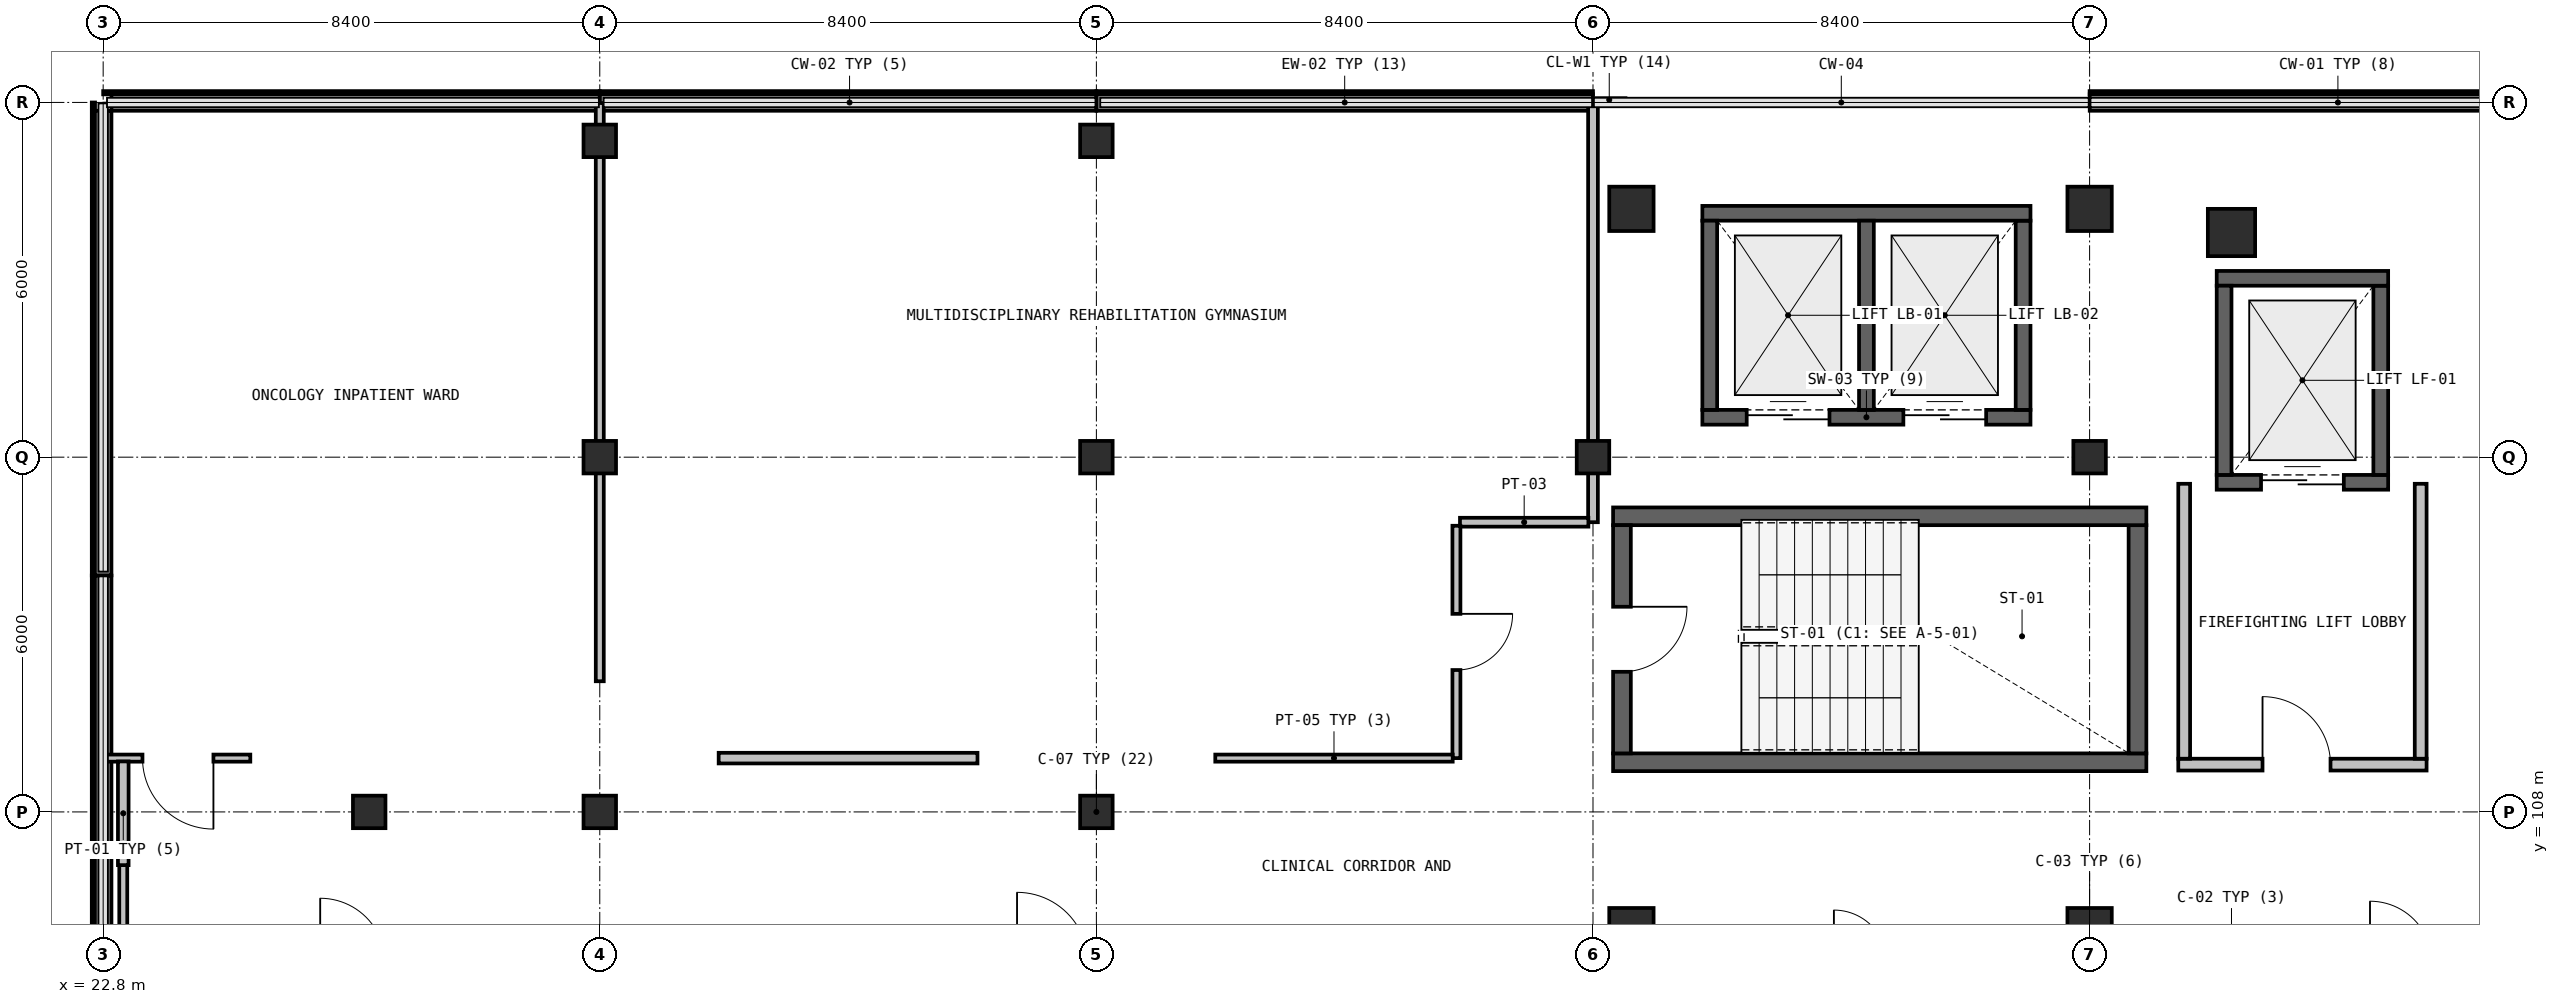
"""IFC4 building model, lengths in metres.
Left out: names, types, materials, properties, quantities, classifications, styles, units other than length and angle.
Written with IfcOpenShell. Run it as: python <this file> out.ifc"""

import sys

from ifc_helpers import new_model, si_unit, direction, frame, frame_2d, origin, origin_2d, place, context, subcontext, project, spatial, rectangle, extrude, element, fill, save


model = new_model("IFC4")
c1 = context("Model", 3, precision=1e-05, world=origin(), true_north=direction((0.0, 1.0)))
c2 = subcontext(c1, "Body", "Model", "MODEL_VIEW")
j1 = project(units=[si_unit("LENGTHUNIT", "METRE"), si_unit("PLANEANGLEUNIT", "RADIAN")], contexts=[c1])
p1 = place(None, origin())
s1 = spatial("IfcSite", under=j1, at=p1, CompositionType="ELEMENT")
p2 = place(p1, origin())
s2 = spatial("IfcBuilding", under=s1, at=p2, CompositionType="ELEMENT")
p3 = place(p2, frame((0.0, 0.0, 31.35)))
s3 = spatial("IfcBuildingStorey", under=s2, at=p3, CompositionType="ELEMENT", Elevation=31.35)
p4 = place(p3, frame((58.8, 117.8, 0.0), z_axis=(0.0, 0.0, 1.0), x_axis=(1.0, 0.0, 0.0)))
e1 = element("IfcColumn", 1, at=p4, inside=s3, PredefinedType="COLUMN", context=c2, shape_type="SweptSolid", body=[
    extrude(rectangle(XDim=0.8, YDim=0.8, at=origin_2d()), origin(), (0.0, 0.0, 1.0), 4.05),
])
for number, where, z_axis, x_axis in (
    (2, (48.65, 106.0, 0.0), (0.0, 0.0, 1.0), (1.0, 0.0, 0.0)),
    (3, (56.4, 106.0, 0.0), (0.0, 0.0, 1.0), (1.0, 0.0, 0.0)),
    (4, (48.65, 118.2, 0.0), (0.0, 0.0, 1.0), (1.0, 0.0, 0.0)),
    (5, (56.4, 118.2, 0.0), (0.0, 0.0, 1.0), (1.0, 0.0, 0.0)),
):
    element("IfcColumn", number, at=place(p3, frame(where, z_axis=z_axis, x_axis=x_axis)), inside=s3, PredefinedType="COLUMN", context=c2, shape_type="SweptSolid", body=[
        extrude(rectangle(XDim=0.75, YDim=0.75, at=origin_2d()), origin(), (0.0, 0.0, 1.0), 4.05),
    ])
p5 = place(p3, frame((27.3, 108.0, 0.0), z_axis=(0.0, 0.0, 1.0), x_axis=(1.0, 0.0, 0.0)))
e6 = element("IfcColumn", 6, at=p5, inside=s3, PredefinedType="COLUMN", context=c2, shape_type="SweptSolid", body=[
    extrude(rectangle(XDim=0.55, YDim=0.55, at=origin_2d()), origin(), (0.0, 0.0, 1.0), 3.778),
])
for number, where, z_axis, x_axis in (
    (7, (31.2, 108.0, 0.0), (0.0, 0.0, 1.0), (1.0, 0.0, 0.0)),
    (8, (31.2, 114.0, 0.0), (0.0, 0.0, 1.0), (1.0, 0.0, 0.0)),
    (9, (31.2, 119.35, 0.0), (0.0, 0.0, 1.0), (1.0, 0.0, 0.0)),
):
    element("IfcColumn", number, at=place(p3, frame(where, z_axis=z_axis, x_axis=x_axis)), inside=s3, PredefinedType="COLUMN", context=c2, shape_type="SweptSolid", body=[
        extrude(rectangle(XDim=0.55, YDim=0.55, at=origin_2d()), origin(), (0.0, 0.0, 1.0), 3.785),
    ])
for number, where, z_axis, x_axis in (
    (10, (39.6, 108.0, 0.0), (0.0, 0.0, 1.0), (1.0, 0.0, 0.0)),
    (11, (39.6, 114.0, 0.0), (0.0, 0.0, 1.0), (1.0, 0.0, 0.0)),
    (12, (39.6, 119.35, 0.0), (0.0, 0.0, 1.0), (1.0, 0.0, 0.0)),
    (13, (48.0, 114.0, 0.0), (0.0, 0.0, 1.0), (1.0, 0.0, 0.0)),
    (14, (56.4, 114.0, 0.0), (0.0, 0.0, 1.0), (1.0, 0.0, 0.0)),
):
    element("IfcColumn", number, at=place(p3, frame(where, z_axis=z_axis, x_axis=x_axis)), inside=s3, PredefinedType="COLUMN", context=c2, shape_type="SweptSolid", body=[
        extrude(rectangle(XDim=0.55, YDim=0.55, at=origin_2d()), origin(), (0.0, 0.0, 1.0), 4.05),
    ])
p6 = place(p3, frame((22.8, 104.001, 0.0), z_axis=(0.0, 0.0, 1.0), x_axis=(0.0, 1.0, 0.0)))
e15 = element("IfcWall", 15, at=p6, inside=s3, PredefinedType="SOLIDWALL", context=c2, shape_type="SweptSolid", body=[
    extrude(rectangle(XDim=7.996, YDim=0.28, at=frame_2d((3.998, 0.0))), origin(), (0.0, 0.0, 1.0), 0.94),
])
p7 = place(p3, frame((22.8, 112.001, 0.0), z_axis=(0.0, 0.0, 1.0), x_axis=(0.0, 1.0, 0.0)))
e16 = element("IfcWall", 16, at=p7, inside=s3, PredefinedType="SOLIDWALL", context=c2, shape_type="SweptSolid", body=[
    extrude(rectangle(XDim=7.858, YDim=0.28, at=frame_2d((3.929, 0.0))), origin(), (0.0, 0.0, 1.0), 0.94),
])
p8 = place(p3, frame((22.94, 119.999, 0.0), z_axis=(0.0, 0.0, 1.0), x_axis=(1.0, 0.0, 0.0)))
e17 = element("IfcWall", 17, at=p8, inside=s3, PredefinedType="SOLIDWALL", context=c2, shape_type="SweptSolid", body=[
    extrude(rectangle(XDim=8.258, YDim=0.28, at=frame_2d((4.129, 0.0))), origin(), (0.0, 0.0, 1.0), 0.94),
])
for number, where, z_axis, x_axis in (
    (18, (31.202, 119.999, 0.0), (0.0, 0.0, 1.0), (1.0, 0.0, 0.0)),
    (19, (39.602, 119.999, 0.0), (0.0, 0.0, 1.0), (1.0, 0.0, 0.0)),
    (20, (56.402, 119.999, 0.0), (0.0, 0.0, 1.0), (1.0, 0.0, 0.0)),
):
    element("IfcWall", number, at=place(p3, frame(where, z_axis=z_axis, x_axis=x_axis)), inside=s3, PredefinedType="SOLIDWALL", context=c2, shape_type="SweptSolid", body=[
        extrude(rectangle(XDim=8.396, YDim=0.28, at=frame_2d((4.198, 0.0))), origin(), (0.0, 0.0, 1.0), 0.94),
    ])
p9 = place(p3, frame((48.34, 108.84, 0.0), z_axis=(0.0, 0.0, 1.0), x_axis=(1.0, 0.0, 0.0)))
e21 = element("IfcWall", 21, at=p9, inside=s3, PredefinedType="SHEAR", context=c2, shape_type="SweptSolid", body=[
    extrude(rectangle(XDim=9.02, YDim=0.3, at=frame_2d((4.51, 0.0))), origin(), (0.0, 0.0, 1.0), 3.785),
])
p10 = place(p3, frame((57.21, 108.99, 0.0), z_axis=(0.0, 0.0, 1.0), x_axis=(0.0, 1.0, 0.0)))
e22 = element("IfcWall", 22, at=p10, inside=s3, PredefinedType="SHEAR", context=c2, shape_type="SweptSolid", body=[
    extrude(rectangle(XDim=3.86, YDim=0.3, at=frame_2d((1.93, 0.0))), origin(), (0.0, 0.0, 1.0), 3.785),
])
p11 = place(p3, frame((57.36, 113.0, 0.0), z_axis=(0.0, 0.0, 1.0), x_axis=(-1.0, 0.0, 0.0)))
e23 = element("IfcWall", 23, at=p11, inside=s3, PredefinedType="SHEAR", context=c2, shape_type="SweptSolid", body=[
    extrude(rectangle(XDim=9.02, YDim=0.3, at=frame_2d((4.51, 0.0))), origin(), (0.0, 0.0, 1.0), 3.785),
])
p12 = place(p3, frame((48.49, 112.85, 0.0), z_axis=(0.0, 0.0, 1.0), x_axis=(0.0, -1.0, 0.0)))
e24 = element("IfcWall", 24, at=p12, inside=s3, PredefinedType="SHEAR", context=c2, shape_type="SweptSolid", body=[
    extrude(rectangle(XDim=3.86, YDim=0.3, at=frame_2d((1.93, 0.0))), origin(), (0.0, 0.0, 1.0), 3.785),
])
p13 = place(p12, frame((1.38, 0.0, 0.0)))
e25 = element("IfcOpeningElement", 25, at=p13, cuts=e24, PredefinedType="OPENING", context=c2, shape_type="SweptSolid", body=[
    extrude(rectangle(XDim=1.1, YDim=2.15, at=frame_2d((0.55, 1.075))), frame((0.0, 0.16, 0.0), z_axis=(0.0, -1.0, 0.0), x_axis=(1.0, 0.0, 0.0)), (0.0, 0.0, 1.0), 0.32),
])
p14 = place(p3, frame((57.9, 108.8, 0.0), z_axis=(0.0, 0.0, 1.0), x_axis=(1.0, 0.0, 0.0)))
e26 = element("IfcWall", 26, at=p14, inside=s3, PredefinedType="SOLIDWALL", context=c2, shape_type="SweptSolid", body=[
    extrude(rectangle(XDim=4.2, YDim=0.2, at=frame_2d((2.1, 0.0))), origin(), (0.0, 0.0, 1.0), 3.785),
])
p15 = place(p14, frame((1.425, 0.0, 0.0)))
e27 = element("IfcOpeningElement", 27, at=p15, cuts=e26, PredefinedType="OPENING", context=c2, shape_type="SweptSolid", body=[
    extrude(rectangle(XDim=1.15, YDim=2.15, at=frame_2d((0.575, 1.075))), frame((0.0, 0.11, 0.0), z_axis=(0.0, -1.0, 0.0), x_axis=(1.0, 0.0, 0.0)), (0.0, 0.0, 1.0), 0.22),
])
for number, where, z_axis, x_axis in (
    (28, (62.0, 108.9, 0.0), (0.0, 0.0, 1.0), (0.0, 1.0, 0.0)),
    (29, (58.0, 113.55, 0.0), (0.0, 0.0, 1.0), (0.0, -1.0, 0.0)),
):
    element("IfcWall", number, at=place(p3, frame(where, z_axis=z_axis, x_axis=x_axis)), inside=s3, PredefinedType="SOLIDWALL", context=c2, shape_type="SweptSolid", body=[
        extrude(rectangle(XDim=4.65, YDim=0.2, at=frame_2d((2.325, 0.0))), origin(), (0.0, 0.0, 1.0), 3.785),
    ])
p16 = place(p3, frame((58.55, 113.575, 0.0), z_axis=(0.0, 0.0, 1.0), x_axis=(1.0, 0.0, 0.0)))
e30 = element("IfcWall", 30, at=p16, inside=s3, PredefinedType="SHEAR", context=c2, shape_type="SweptSolid", body=[
    extrude(rectangle(XDim=2.9, YDim=0.25, at=frame_2d((1.45, 0.0))), origin(), (0.0, 0.0, 1.0), 3.785),
])
p17 = place(p16, frame((0.75, 0.0, 0.0)))
e31 = element("IfcOpeningElement", 31, at=p17, cuts=e30, PredefinedType="OPENING", context=c2, shape_type="SweptSolid", body=[
    extrude(rectangle(XDim=1.4, YDim=2.15, at=frame_2d((0.7, 1.075))), frame((0.0, 0.135, 0.0), z_axis=(0.0, -1.0, 0.0), x_axis=(1.0, 0.0, 0.0)), (0.0, 0.0, 1.0), 0.27),
])
p18 = place(p3, frame((61.325, 113.7, 0.0), z_axis=(0.0, 0.0, 1.0), x_axis=(0.0, 1.0, 0.0)))
e32 = element("IfcWall", 32, at=p18, inside=s3, PredefinedType="SHEAR", context=c2, shape_type="SweptSolid", body=[
    extrude(rectangle(XDim=3.2, YDim=0.25, at=frame_2d((1.6, 0.0))), origin(), (0.0, 0.0, 1.0), 3.785),
])
p19 = place(p3, frame((61.45, 117.025, 0.0), z_axis=(0.0, 0.0, 1.0), x_axis=(-1.0, 0.0, 0.0)))
e33 = element("IfcWall", 33, at=p19, inside=s3, PredefinedType="SHEAR", context=c2, shape_type="SweptSolid", body=[
    extrude(rectangle(XDim=2.9, YDim=0.25, at=frame_2d((1.45, 0.0))), origin(), (0.0, 0.0, 1.0), 3.785),
])
p20 = place(p3, frame((58.675, 116.9, 0.0), z_axis=(0.0, 0.0, 1.0), x_axis=(0.0, -1.0, 0.0)))
e34 = element("IfcWall", 34, at=p20, inside=s3, PredefinedType="SHEAR", context=c2, shape_type="SweptSolid", body=[
    extrude(rectangle(XDim=3.2, YDim=0.25, at=frame_2d((1.6, 0.0))), origin(), (0.0, 0.0, 1.0), 3.785),
])
p21 = place(p3, frame((49.85, 114.675, 0.0), z_axis=(0.0, 0.0, 1.0), x_axis=(1.0, 0.0, 0.0)))
e35 = element("IfcWall", 35, at=p21, inside=s3, PredefinedType="SHEAR", context=c2, shape_type="SweptSolid", body=[
    extrude(rectangle(XDim=5.55, YDim=0.25, at=frame_2d((2.775, 0.0))), origin(), (0.0, 0.0, 1.0), 3.785),
])
p22 = place(p21, frame((0.75, 0.0, 0.0)))
e36 = element("IfcOpeningElement", 36, at=p22, cuts=e35, PredefinedType="OPENING", context=c2, shape_type="SweptSolid", body=[
    extrude(rectangle(XDim=1.4, YDim=2.2, at=frame_2d((0.7, 1.1))), frame((0.0, 0.135, 0.0), z_axis=(0.0, -1.0, 0.0), x_axis=(1.0, 0.0, 0.0)), (0.0, 0.0, 1.0), 0.27),
])
p23 = place(p21, frame((3.4, 0.0, 0.0)))
e37 = element("IfcOpeningElement", 37, at=p23, cuts=e35, PredefinedType="OPENING", context=c2, shape_type="SweptSolid", body=[
    extrude(rectangle(XDim=1.4, YDim=2.2, at=frame_2d((0.7, 1.1))), frame((0.0, 0.135, 0.0), z_axis=(0.0, -1.0, 0.0), x_axis=(1.0, 0.0, 0.0)), (0.0, 0.0, 1.0), 0.27),
])
p24 = place(p3, frame((55.275, 114.8, 0.0), z_axis=(0.0, 0.0, 1.0), x_axis=(0.0, 1.0, 0.0)))
e38 = element("IfcWall", 38, at=p24, inside=s3, PredefinedType="SHEAR", context=c2, shape_type="SweptSolid", body=[
    extrude(rectangle(XDim=3.2, YDim=0.25, at=frame_2d((1.6, 0.0))), origin(), (0.0, 0.0, 1.0), 3.785),
])
p25 = place(p3, frame((55.4, 118.125, 0.0), z_axis=(0.0, 0.0, 1.0), x_axis=(-1.0, 0.0, 0.0)))
e39 = element("IfcWall", 39, at=p25, inside=s3, PredefinedType="SHEAR", context=c2, shape_type="SweptSolid", body=[
    extrude(rectangle(XDim=5.55, YDim=0.25, at=frame_2d((2.775, 0.0))), origin(), (0.0, 0.0, 1.0), 3.785),
])
for number, where, z_axis, x_axis in (
    (40, (49.975, 118.0, 0.0), (0.0, 0.0, 1.0), (0.0, -1.0, 0.0)),
    (41, (52.625, 114.8, 0.0), (0.0, 0.0, 1.0), (0.0, 1.0, 0.0)),
):
    element("IfcWall", number, at=place(p3, frame(where, z_axis=z_axis, x_axis=x_axis)), inside=s3, PredefinedType="SHEAR", context=c2, shape_type="SweptSolid", body=[
        extrude(rectangle(XDim=3.2, YDim=0.25, at=frame_2d((1.6, 0.0))), origin(), (0.0, 0.0, 1.0), 3.785),
    ])
p26 = place(p3, frame((23.14, 107.1, 0.0), z_axis=(0.0, 0.0, 1.0), x_axis=(0.0, -1.0, 0.0)))
e42 = element("IfcWall", 42, at=p26, inside=s3, PredefinedType="PARTITIONING", context=c2, shape_type="SweptSolid", body=[
    extrude(rectangle(XDim=1.6, YDim=0.135, at=frame_2d((0.8, 0.0))), origin(), (0.0, 0.0, 1.0), 3.785),
])
p27 = place(p3, frame((31.2, 119.99, 0.0), z_axis=(0.0, 0.0, 1.0), x_axis=(0.0, -1.0, 0.0)))
e43 = element("IfcWall", 43, at=p27, inside=s3, PredefinedType="PARTITIONING", context=c2, shape_type="SweptSolid", body=[
    extrude(rectangle(XDim=9.78, YDim=0.135, at=frame_2d((4.89, 0.0))), origin(), (0.0, 0.0, 1.0), 3.785),
])
p28 = place(p3, frame((25.289, 108.91, 0.0), z_axis=(0.0, 0.0, 1.0), x_axis=(-1.0, 0.0, 0.0)))
e44 = element("IfcWall", 44, at=p28, inside=s3, PredefinedType="PARTITIONING", context=c2, shape_type="SweptSolid", body=[
    extrude(rectangle(XDim=2.447, YDim=0.12, at=frame_2d((1.224, 0.0))), origin(), (0.0, 0.0, 1.0), 3.785),
])
p29 = place(p28, frame((0.624, 0.0, 0.0)))
e45 = element("IfcOpeningElement", 45, at=p29, cuts=e44, PredefinedType="OPENING", context=c2, shape_type="SweptSolid", body=[
    extrude(rectangle(XDim=1.2, YDim=2.15, at=frame_2d((0.6, 1.075))), frame((0.0, 0.07, 0.0), z_axis=(0.0, -1.0, 0.0), x_axis=(1.0, 0.0, 0.0)), (0.0, 0.0, 1.0), 0.14),
])
p30 = place(p3, frame((23.14, 108.854, 0.0), z_axis=(0.0, 0.0, 1.0), x_axis=(0.0, -1.0, 0.0)))
e46 = element("IfcWall", 46, at=p30, inside=s3, PredefinedType="PARTITIONING", context=c2, shape_type="SweptSolid", body=[
    extrude(rectangle(XDim=1.754, YDim=0.18, at=frame_2d((0.877, 0.0))), origin(), (0.0, 0.0, 1.0), 3.785),
])
p31 = place(p3, frame((48.0, 119.99, 0.0), z_axis=(0.0, 0.0, 1.0), x_axis=(0.0, -1.0, 0.0)))
e47 = element("IfcWall", 47, at=p31, inside=s3, PredefinedType="PARTITIONING", context=c2, shape_type="SweptSolid", body=[
    extrude(rectangle(XDim=7.09, YDim=0.165, at=frame_2d((3.545, 0.0))), origin(), (0.0, 0.0, 1.0), 3.185),
])
p32 = place(p3, frame((47.922, 112.9, 0.0), z_axis=(0.0, 0.0, 1.0), x_axis=(-1.0, 0.0, 0.0)))
e48 = element("IfcWall", 48, at=p32, inside=s3, PredefinedType="PARTITIONING", context=c2, shape_type="SweptSolid", body=[
    extrude(rectangle(XDim=2.172, YDim=0.15, at=frame_2d((1.086, 0.0))), origin(), (0.0, 0.0, 1.0), 3.785),
])
p33 = place(p3, frame((45.69, 112.84, 0.0), z_axis=(0.0, 0.0, 1.0), x_axis=(0.0, -1.0, 0.0)))
e49 = element("IfcWall", 49, at=p33, inside=s3, PredefinedType="PARTITIONING", context=c2, shape_type="SweptSolid", body=[
    extrude(rectangle(XDim=3.93, YDim=0.135, at=frame_2d((1.965, 0.0))), origin(), (0.0, 0.0, 1.0), 3.785),
])
p34 = place(p33, frame((1.49, 0.0, 0.0)))
e50 = element("IfcOpeningElement", 50, at=p34, cuts=e49, PredefinedType="OPENING", context=c2, shape_type="SweptSolid", body=[
    extrude(rectangle(XDim=0.95, YDim=2.1, at=frame_2d((0.475, 1.05))), frame((0.0, 0.077, 0.0), z_axis=(0.0, -1.0, 0.0), x_axis=(1.0, 0.0, 0.0)), (0.0, 0.0, 1.0), 0.155),
])
p35 = place(p3, frame((45.627, 108.91, 0.0), z_axis=(0.0, 0.0, 1.0), x_axis=(-1.0, 0.0, 0.0)))
e51 = element("IfcWall", 51, at=p35, inside=s3, PredefinedType="PARTITIONING", context=c2, shape_type="SweptSolid", body=[
    extrude(rectangle(XDim=4.016, YDim=0.12, at=frame_2d((2.008, 0.0))), origin(), (0.0, 0.0, 1.0), 3.785),
])
p36 = place(p3, frame((37.589, 108.91, 0.0), z_axis=(0.0, 0.0, 1.0), x_axis=(-1.0, 0.0, 0.0)))
e52 = element("IfcWall", 52, at=p36, inside=s3, PredefinedType="PARTITIONING", context=c2, shape_type="SweptSolid", body=[
    extrude(rectangle(XDim=4.378, YDim=0.18, at=frame_2d((2.189, 0.0))), origin(), (0.0, 0.0, 1.0), 3.785),
])
p37 = place(p13, origin())
e53 = element("IfcDoor", 53, at=p37, inside=s3, OperationType="SINGLE_SWING_LEFT", PredefinedType="DOOR", context=c2, shape_type="SweptSolid", body=[
    extrude(rectangle(XDim=1.1, YDim=2.15, at=frame_2d((0.55, 1.075))), frame((0.0, 0.025, 0.0), z_axis=(0.0, -1.0, 0.0), x_axis=(1.0, 0.0, 0.0)), (0.0, 0.0, 1.0), 0.05),
])
fill(e25, e53)
p38 = place(p15, origin())
e54 = element("IfcDoor", 54, at=p38, inside=s3, OperationType="SINGLE_SWING_RIGHT", PredefinedType="DOOR", context=c2, shape_type="SweptSolid", body=[
    extrude(rectangle(XDim=1.15, YDim=2.15, at=frame_2d((0.575, 1.075))), frame((0.0, 0.025, 0.0), z_axis=(0.0, -1.0, 0.0), x_axis=(1.0, 0.0, 0.0)), (0.0, 0.0, 1.0), 0.05),
])
fill(e27, e54)
p39 = place(p17, origin())
e55 = element("IfcDoor", 55, at=p39, inside=s3, OperationType="DOUBLE_DOOR_SLIDING", PredefinedType="DOOR", context=c2, shape_type="SweptSolid", body=[
    extrude(rectangle(XDim=1.4, YDim=2.15, at=frame_2d((0.7, 1.075))), frame((0.0, 0.025, 0.0), z_axis=(0.0, -1.0, 0.0), x_axis=(1.0, 0.0, 0.0)), (0.0, 0.0, 1.0), 0.05),
])
fill(e31, e55)
p40 = place(p22, origin())
e56 = element("IfcDoor", 56, at=p40, inside=s3, OperationType="DOUBLE_DOOR_SLIDING", PredefinedType="DOOR", context=c2, shape_type="SweptSolid", body=[
    extrude(rectangle(XDim=1.4, YDim=2.2, at=frame_2d((0.7, 1.1))), frame((0.0, 0.025, 0.0), z_axis=(0.0, -1.0, 0.0), x_axis=(1.0, 0.0, 0.0)), (0.0, 0.0, 1.0), 0.05),
])
fill(e36, e56)
p41 = place(p23, origin())
e57 = element("IfcDoor", 57, at=p41, inside=s3, OperationType="DOUBLE_DOOR_SLIDING", PredefinedType="DOOR", context=c2, shape_type="SweptSolid", body=[
    extrude(rectangle(XDim=1.4, YDim=2.2, at=frame_2d((0.7, 1.1))), frame((0.0, 0.025, 0.0), z_axis=(0.0, -1.0, 0.0), x_axis=(1.0, 0.0, 0.0)), (0.0, 0.0, 1.0), 0.05),
])
fill(e37, e57)
p42 = place(p29, origin())
e58 = element("IfcDoor", 58, at=p42, inside=s3, OperationType="SINGLE_SWING_RIGHT", PredefinedType="DOOR", context=c2, shape_type="SweptSolid", body=[
    extrude(rectangle(XDim=1.2, YDim=2.15, at=frame_2d((0.6, 1.075))), frame((0.0, 0.025, 0.0), z_axis=(0.0, -1.0, 0.0), x_axis=(1.0, 0.0, 0.0)), (0.0, 0.0, 1.0), 0.05),
])
fill(e45, e58)
p43 = place(p34, origin())
e59 = element("IfcDoor", 59, at=p43, inside=s3, OperationType="SINGLE_SWING_LEFT", PredefinedType="DOOR", context=c2, shape_type="SweptSolid", body=[
    extrude(rectangle(XDim=0.95, YDim=2.1, at=frame_2d((0.475, 1.05))), frame((0.0, 0.025, 0.0), z_axis=(0.0, -1.0, 0.0), x_axis=(1.0, 0.0, 0.0)), (0.0, 0.0, 1.0), 0.05),
])
fill(e50, e59)
save(model, sys.argv[1])
